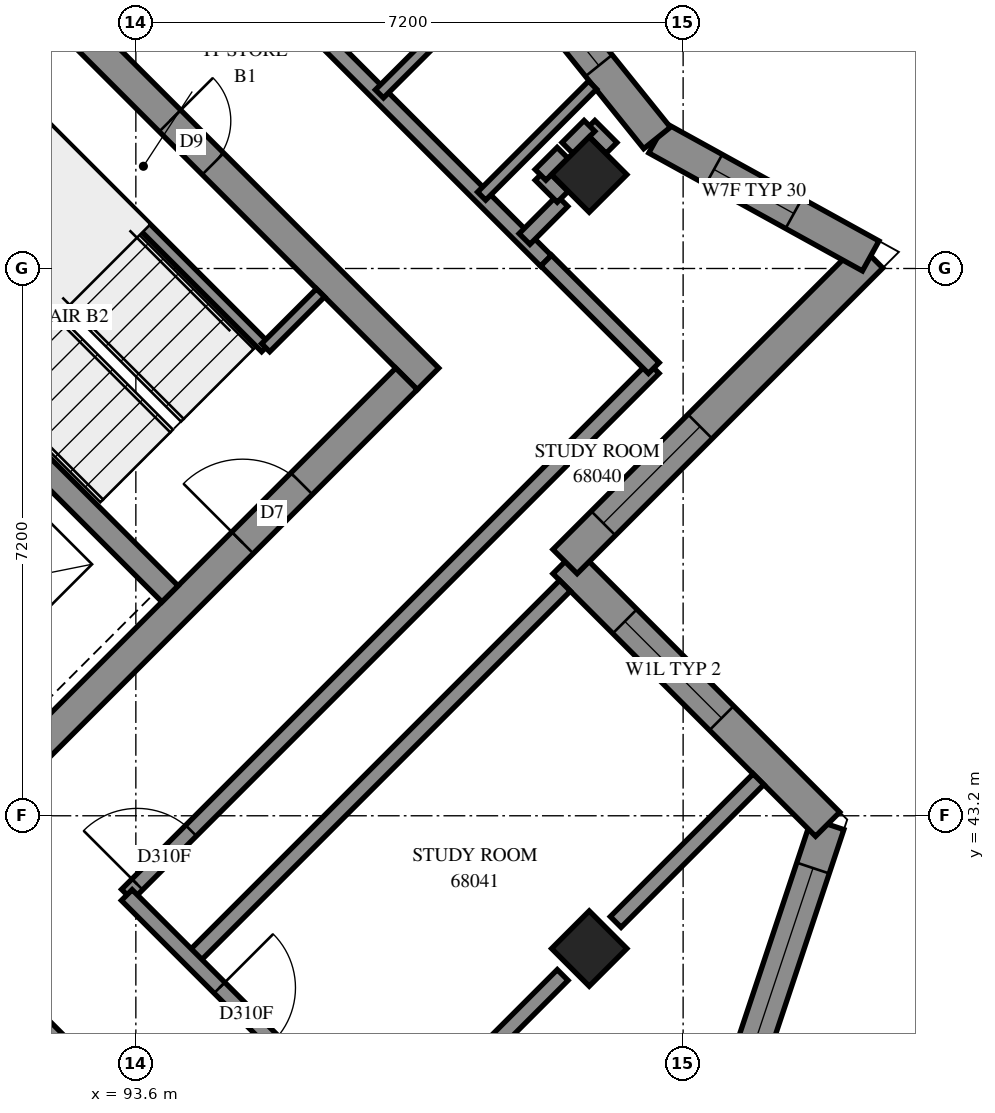
"""IFC4 building model, lengths in metres.
Left out: names, types, materials, properties, quantities, classifications, styles, units other than length and angle.
Written with IfcOpenShell. Run it as: python <this file> out.ifc"""

import sys

from ifc_helpers import new_model, si_unit, direction, frame, frame_2d, origin, origin_2d, place, context, subcontext, project, spatial, polyline, rectangle, outline, extrude, element, fill, save


model = new_model("IFC4")
c1 = context("Model", 3, precision=1e-05, world=origin(), true_north=direction((0.0, 1.0)))
c2 = subcontext(c1, "Body", "Model", "MODEL_VIEW")
j1 = project(units=[si_unit("LENGTHUNIT", "METRE"), si_unit("PLANEANGLEUNIT", "RADIAN")], contexts=[c1])
p1 = place(None, origin())
s1 = spatial("IfcSite", under=j1, at=p1, CompositionType="ELEMENT")
p2 = place(p1, origin())
s2 = spatial("IfcBuilding", under=s1, at=p2, CompositionType="ELEMENT")
p3 = place(p2, frame((0.0, 0.0, 250.6)))
s3 = spatial("IfcBuildingStorey", under=s2, at=p3, CompositionType="ELEMENT", Elevation=250.6)
for number, where, z_axis, x_axis in (
    (1, (99.565, 51.635, 0.0), (0.0, 0.0, 1.0), (0.707, -0.707, 0.0)),
    (2, (99.565, 41.453, 0.0), (0.0, 0.0, 1.0), (0.707, -0.707, 0.0)),
):
    element("IfcColumn", number, at=place(p3, frame(where, z_axis=z_axis, x_axis=x_axis)), inside=s3, PredefinedType="COLUMN", context=c2, shape_type="SweptSolid", body=[
        extrude(rectangle(XDim=0.7, YDim=0.7, at=origin_2d()), origin(), (0.0, 0.0, 1.0), 3.1),
    ])
p4 = place(p3, frame((86.695, 59.696, -0.3), z_axis=(0.0, 0.0, 1.0), x_axis=(0.7071100706, -0.7071034917, 0.0)))
e3 = element("IfcWall", 3, at=p4, inside=s3, PredefinedType="SHEAR", context=c2, shape_type="SweptSolid", body=[
    extrude(rectangle(XDim=15.2, YDim=0.4, at=frame_2d((7.6, 0.0))), origin(), (0.0, 0.0, 1.0), 2.7),
])
p5 = place(p4, frame((10.4, 0.0, 0.3)))
e4 = element("IfcOpeningElement", 4, at=p5, cuts=e3, PredefinedType="OPENING", context=c2, shape_type="SweptSolid", body=[
    extrude(rectangle(XDim=0.8, YDim=2.1, at=frame_2d((0.4, 1.05))), frame((0.0, 0.21, 0.0), z_axis=(0.0, -1.0, 0.0), x_axis=(1.0, 0.0, 0.0)), (0.0, 0.0, 1.0), 0.42),
])
p6 = place(p3, frame((86.978, 38.766, -0.3), z_axis=(0.0, 0.0, 1.0), x_axis=(0.7071067812, 0.7071067812, 0.0)))
e5 = element("IfcWall", 5, at=p6, inside=s3, PredefinedType="SHEAR", context=c2, shape_type="SweptSolid", body=[
    extrude(rectangle(XDim=14.4, YDim=0.4, at=frame_2d((7.2, 0.0))), origin(), (0.0, 0.0, 1.0), 2.7),
])
p7 = place(p6, frame((4.55, 0.0, 0.3)))
e6 = element("IfcOpeningElement", 6, at=p7, cuts=e5, PredefinedType="OPENING", context=c2, shape_type="SweptSolid", body=[
    extrude(rectangle(XDim=1.1, YDim=2.1, at=frame_2d((0.55, 1.05))), frame((0.0, 0.21, 0.0), z_axis=(0.0, -1.0, 0.0), x_axis=(1.0, 0.0, 0.0)), (0.0, 0.0, 1.0), 0.42),
])
p8 = place(p6, frame((11.35, 0.0, 0.3)))
e7 = element("IfcOpeningElement", 7, at=p8, cuts=e5, PredefinedType="OPENING", context=c2, shape_type="SweptSolid", body=[
    extrude(rectangle(XDim=1.1, YDim=2.1, at=frame_2d((0.55, 1.05))), frame((0.0, 0.21, 0.0), z_axis=(0.0, -1.0, 0.0), x_axis=(1.0, 0.0, 0.0)), (0.0, 0.0, 1.0), 0.42),
])
p9 = place(p3, frame((88.958, 51.211, 0.0), z_axis=(0.0, 0.0, 1.0), x_axis=(0.7070998367, -0.7071137256, 0.0)))
e8 = element("IfcWall", 8, at=p9, inside=s3, PredefinedType="SOLIDWALL", context=c2, shape_type="SweptSolid", body=[
    extrude(rectangle(XDim=7.2, YDim=0.3, at=frame_2d((3.6, 0.0))), origin(), (0.0, 0.0, 1.0), 3.1),
])
p10 = place(p3, frame((101.082, 38.232, 0.0), z_axis=(0.0, 0.0, 1.0), x_axis=(0.316227766, 0.9486832981, 0.0)))
e9 = element("IfcWall", 9, at=p10, inside=s3, PredefinedType="SOLIDWALL", context=c2, shape_type="SweptSolid", body=[
    extrude(outline(polyline([(-0.108, -0.225), (5.259, -0.225), (4.981, 0.225), (0.108, 0.225), (-0.108, -0.225)])), origin(), (0.0, 0.0, 1.0), 3.1),
])
p11 = place(p10, frame((1.711, 0.0, 0.45)))
e10 = element("IfcOpeningElement", 10, at=p11, cuts=e9, PredefinedType="OPENING", context=c2, shape_type="SweptSolid", body=[
    extrude(rectangle(XDim=2.8, YDim=2.55, at=frame_2d((1.4, 1.275))), frame((0.0, 0.235, 0.0), z_axis=(0.0, -1.0, 0.0), x_axis=(1.0, 0.0, 0.0)), (0.0, 0.0, 1.0), 0.47),
])
p12 = place(p3, frame((102.701, 43.089, 0.0), z_axis=(0.0, 0.0, 1.0), x_axis=(-0.7070965479, 0.7071170144, 0.0)))
e11 = element("IfcWall", 11, at=p12, inside=s3, PredefinedType="SOLIDWALL", context=c2, shape_type="SweptSolid", body=[
    extrude(outline(polyline([(-0.139, -0.225), (4.661, -0.225), (5.111, 0.225), (0.139, 0.225), (-0.139, -0.225)])), origin(), (0.0, 0.0, 1.0), 3.1),
])
p13 = place(p12, frame((1.974, 0.0, 0.6)))
e12 = element("IfcOpeningElement", 12, at=p13, cuts=e11, PredefinedType="OPENING", context=c2, shape_type="SweptSolid", body=[
    extrude(rectangle(XDim=1.8, YDim=1.9, at=frame_2d((0.9, 0.95))), frame((0.0, 0.235, 0.0), z_axis=(0.0, -1.0, 0.0), x_axis=(1.0, 0.0, 0.0)), (0.0, 0.0, 1.0), 0.47),
])
p14 = place(p3, frame((99.246, 46.544, 0.0), z_axis=(0.0, 0.0, 1.0), x_axis=(0.7071067812, 0.7071067812, 0.0)))
e13 = element("IfcWall", 13, at=p14, inside=s3, PredefinedType="SOLIDWALL", context=c2, shape_type="SweptSolid", body=[
    extrude(outline(polyline([(0.225, -0.225), (5.986, -0.225), (5.388, 0.225), (-0.225, 0.225), (0.225, -0.225)])), origin(), (0.0, 0.0, 1.0), 3.1),
])
p15 = place(p14, frame((0.713, 0.0, 0.6)))
e14 = element("IfcOpeningElement", 14, at=p15, cuts=e13, PredefinedType="OPENING", context=c2, shape_type="SweptSolid", body=[
    extrude(rectangle(XDim=1.8, YDim=1.9, at=frame_2d((0.9, 0.95))), frame((0.0, 0.235, 0.0), z_axis=(0.0, -1.0, 0.0), x_axis=(1.0, 0.0, 0.0)), (0.0, 0.0, 1.0), 0.47),
])
p16 = place(p3, frame((103.268, 50.565, 0.0), z_axis=(0.0, 0.0, 1.0), x_axis=(-0.8754572741, 0.4832955216, 0.0)))
e15 = element("IfcWall", 15, at=p16, inside=s3, PredefinedType="SOLIDWALL", context=c2, shape_type="SweptSolid", body=[
    extrude(outline(polyline([(-0.299, -0.225), (3.166, -0.225), (3.255, 0.225), (0.299, 0.225), (-0.299, -0.225)])), origin(), (0.0, 0.0, 1.0), 3.1),
])
p17 = place(p16, frame((1.155, 0.0, 0.45)))
e16 = element("IfcOpeningElement", 16, at=p17, cuts=e15, PredefinedType="OPENING", context=c2, shape_type="SweptSolid", body=[
    extrude(rectangle(XDim=1.2, YDim=2.55, at=frame_2d((0.6, 1.275))), frame((0.0, 0.235, 0.0), z_axis=(0.0, -1.0, 0.0), x_axis=(1.0, 0.0, 0.0)), (0.0, 0.0, 1.0), 0.47),
])
p18 = place(p3, frame((100.457, 52.117, 0.0), z_axis=(0.0, 0.0, 1.0), x_axis=(-0.6267598202, 0.7792125049, 0.0)))
e17 = element("IfcWall", 17, at=p18, inside=s3, PredefinedType="SOLIDWALL", context=c2, shape_type="SweptSolid", body=[
    extrude(outline(polyline([(0.044, -0.225), (3.393, -0.225), (3.345, 0.225), (-0.044, 0.225), (0.044, -0.225)])), origin(), (0.0, 0.0, 1.0), 3.1),
])
p19 = place(p18, frame((1.222, 0.0, 0.45)))
e18 = element("IfcOpeningElement", 18, at=p19, cuts=e17, PredefinedType="OPENING", context=c2, shape_type="SweptSolid", body=[
    extrude(rectangle(XDim=1.2, YDim=2.55, at=frame_2d((0.6, 1.275))), frame((0.0, 0.235, 0.0), z_axis=(0.0, -1.0, 0.0), x_axis=(1.0, 0.0, 0.0)), (0.0, 0.0, 1.0), 0.47),
])
p20 = place(p3, frame((91.313, 53.354, 0.0), z_axis=(0.0, 0.0, 1.0), x_axis=(0.7071067812, -0.7071067812, 0.0)))
e19 = element("IfcWall", 19, at=p20, inside=s3, PredefinedType="PARTITIONING", context=c2, shape_type="SweptSolid", body=[
    extrude(rectangle(XDim=5.65, YDim=0.15, at=frame_2d((2.825, 0.0))), origin(), (0.0, 0.0, 1.0), 3.1),
])
p21 = place(p3, frame((95.308, 49.358, 0.0), z_axis=(0.0, 0.0, 1.0), x_axis=(0.70705776, 0.707155799, 0.0)))
e20 = element("IfcWall", 20, at=p21, inside=s3, PredefinedType="PARTITIONING", context=c2, shape_type="SweptSolid", body=[
    extrude(rectangle(XDim=1.02, YDim=0.15, at=frame_2d((0.51, 0.0))), origin(), (0.0, 0.0, 1.0), 3.1),
])
p22 = place(p3, frame((93.483, 42.161, 0.0), z_axis=(0.0, 0.0, 1.0), x_axis=(0.7071067812, 0.7071067812, 0.0)))
e21 = element("IfcWall", 21, at=p22, inside=s3, PredefinedType="PARTITIONING", context=c2, shape_type="SweptSolid", body=[
    extrude(rectangle(XDim=9.8, YDim=0.2, at=frame_2d((4.9, 0.0))), origin(), (0.0, 0.0, 1.0), 3.1),
])
p23 = place(p22, frame((0.193, 0.0, 0.0)))
e22 = element("IfcOpeningElement", 22, at=p23, cuts=e21, PredefinedType="OPENING", context=c2, shape_type="SweptSolid", body=[
    extrude(rectangle(XDim=1.0, YDim=2.1, at=frame_2d((0.5, 1.05))), frame((0.0, 0.11, 0.0), z_axis=(0.0, -1.0, 0.0), x_axis=(1.0, 0.0, 0.0)), (0.0, 0.0, 1.0), 0.22),
])
p24 = place(p3, frame((94.331, 41.313, 0.0), z_axis=(0.0, 0.0, 1.0), x_axis=(0.7071139756, 0.7070995867, 0.0)))
e23 = element("IfcWall", 23, at=p24, inside=s3, PredefinedType="PARTITIONING", context=c2, shape_type="SweptSolid", body=[
    extrude(rectangle(XDim=6.95, YDim=0.2, at=frame_2d((3.475, 0.0))), origin(), (0.0, 0.0, 1.0), 3.1),
])
p25 = place(p3, frame((93.481, 42.157, 0.0), z_axis=(0.0, 0.0, 1.0), x_axis=(0.7071067812, -0.7071067812, 0.0)))
e24 = element("IfcWall", 24, at=p25, inside=s3, PredefinedType="PARTITIONING", context=c2, shape_type="SweptSolid", body=[
    extrude(rectangle(XDim=4.8, YDim=0.2, at=frame_2d((2.4, 0.0))), origin(), (0.0, 0.0, 1.0), 3.1),
])
p26 = place(p25, frame((1.725, 0.0, 0.0)))
e25 = element("IfcOpeningElement", 25, at=p26, cuts=e24, PredefinedType="OPENING", context=c2, shape_type="SweptSolid", body=[
    extrude(rectangle(XDim=1.0, YDim=2.1, at=frame_2d((0.5, 1.05))), frame((0.0, 0.11, 0.0), z_axis=(0.0, -1.0, 0.0), x_axis=(1.0, 0.0, 0.0)), (0.0, 0.0, 1.0), 0.22),
])
p27 = place(p3, frame((92.073, 40.749, 0.0), z_axis=(0.0, 0.0, 1.0), x_axis=(0.7071067812, -0.7071067812, 0.0)))
e26 = element("IfcWall", 26, at=p27, inside=s3, PredefinedType="PARTITIONING", context=c2, shape_type="SweptSolid", body=[
    extrude(rectangle(XDim=4.8, YDim=0.2, at=frame_2d((2.4, 0.0))), origin(), (0.0, 0.0, 1.0), 3.1),
])
p28 = place(p27, frame((1.725, 0.0, 0.0)))
e27 = element("IfcOpeningElement", 27, at=p28, cuts=e26, PredefinedType="OPENING", context=c2, shape_type="SweptSolid", body=[
    extrude(rectangle(XDim=1.0, YDim=2.1, at=frame_2d((0.5, 1.05))), frame((0.0, 0.11, 0.0), z_axis=(0.0, -1.0, 0.0), x_axis=(1.0, 0.0, 0.0)), (0.0, 0.0, 1.0), 0.22),
])
p29 = place(p3, frame((96.167, 53.329, 0.0), z_axis=(0.0, 0.0, 1.0), x_axis=(0.7071067812, -0.7071067812, 0.0)))
e28 = element("IfcWall", 28, at=p29, inside=s3, PredefinedType="PARTITIONING", context=c2, shape_type="SweptSolid", body=[
    extrude(rectangle(XDim=3.999, YDim=0.2, at=frame_2d((2.0, 0.0))), origin(), (0.0, 0.0, 1.0), 3.1),
])
p30 = place(p3, frame((96.877, 38.767, 0.0), z_axis=(0.0, 0.0, 1.0), x_axis=(0.7071067812, 0.7071067812, 0.0)))
e29 = element("IfcWall", 29, at=p30, inside=s3, PredefinedType="PARTITIONING", context=c2, shape_type="SweptSolid", body=[
    extrude(rectangle(XDim=3.306, YDim=0.2, at=frame_2d((1.653, 0.0))), origin(), (0.0, 0.0, 1.0), 2.6),
])
p31 = place(p3, frame((99.913, 41.803, 0.0), z_axis=(0.0, 0.0, 1.0), x_axis=(0.7071067812, 0.7071067812, 0.0)))
e30 = element("IfcWall", 30, at=p31, inside=s3, PredefinedType="PARTITIONING", context=c2, shape_type="SweptSolid", body=[
    extrude(rectangle(XDim=2.656, YDim=0.2, at=frame_2d((1.328, 0.0))), origin(), (0.0, 0.0, 1.0), 3.1),
])
p32 = place(p3, frame((96.804, 52.698, 0.0), z_axis=(0.0, 0.0, 1.0), x_axis=(0.7075691222, 0.7066441377, 0.0)))
e31 = element("IfcWall", 31, at=p32, inside=s3, PredefinedType="PARTITIONING", context=c2, shape_type="SweptSolid", body=[
    extrude(rectangle(XDim=2.27, YDim=0.15, at=frame_2d((1.135, 0.0))), origin(), (0.0, 0.0, 1.0), 3.1),
])
p33 = place(p32, frame((1.166, 0.0, 0.0)))
e32 = element("IfcOpeningElement", 32, at=p33, cuts=e31, PredefinedType="OPENING", context=c2, shape_type="SweptSolid", body=[
    extrude(rectangle(XDim=0.8, YDim=2.1, at=frame_2d((0.4, 1.05))), frame((0.0, 0.085, 0.0), z_axis=(0.0, -1.0, 0.0), x_axis=(1.0, 0.0, 0.0)), (0.0, 0.0, 1.0), 0.17),
])
p34 = place(p3, frame((98.149, 51.353, 0.0), z_axis=(0.0, 0.0, 1.0), x_axis=(0.707082559, 0.7071310026, 0.0)))
e33 = element("IfcWall", 33, at=p34, inside=s3, PredefinedType="PARTITIONING", context=c2, shape_type="SweptSolid", body=[
    extrude(rectangle(XDim=2.064, YDim=0.15, at=frame_2d((1.032, 0.0))), origin(), (0.0, 0.0, 1.0), 3.1),
])
p35 = place(p3, frame((98.998, 50.504, 0.0), z_axis=(0.0, 0.0, 1.0), x_axis=(0.7076063266, -0.7066068826, 0.0)))
e34 = element("IfcWall", 34, at=p35, inside=s3, PredefinedType="PARTITIONING", context=c2, shape_type="SweptSolid", body=[
    extrude(rectangle(XDim=2.001, YDim=0.2, at=frame_2d((1.001, 0.0))), origin(), (0.0, 0.0, 1.0), 3.1),
])
p36 = place(p3, frame((98.714, 50.788, 0.0), z_axis=(0.0, 0.0, 1.0), x_axis=(0.7056883165, 0.7085224061, 0.0)))
e35 = element("IfcWall", 35, at=p36, inside=s3, PredefinedType="PARTITIONING", context=c2, shape_type="SweptSolid", body=[
    extrude(rectangle(XDim=0.706, YDim=0.2, at=frame_2d((0.353, 0.0))), origin(), (0.0, 0.0, 1.0), 3.1),
])
for number, where, z_axis, x_axis in (
    (36, (99.568, 52.276, 0.0), (0.0, 0.0, 1.0), (0.707, -0.707, 0.0)),
    (37, (99.278, 51.986, 0.0), (0.0, 0.0, 1.0), (0.707, 0.707, 0.0)),
    (38, (98.925, 51.633, 0.0), (0.0, 0.0, 1.0), (0.707, -0.707, 0.0)),
    (39, (98.924, 51.632, 0.0), (0.0, 0.0, 1.0), (0.707, 0.707, 0.0)),
):
    element("IfcWall", number, at=place(p3, frame(where, z_axis=z_axis, x_axis=x_axis)), inside=s3, PredefinedType="PARTITIONING", context=c2, shape_type="SweptSolid", body=[
        extrude(rectangle(XDim=0.41, YDim=0.2, at=frame_2d((0.205, 0.0))), origin(), (0.0, 0.0, 1.0), 3.1),
    ])
p37 = place(p11, origin())
e40 = element("IfcWindow", 40, at=p37, inside=s3, PartitioningType="SINGLE_PANEL", PredefinedType="WINDOW", context=c2, shape_type="SweptSolid", body=[
    extrude(rectangle(XDim=2.8, YDim=2.55, at=frame_2d((1.4, 1.275))), frame((0.0, 0.205, 0.0), z_axis=(0.0, -1.0, 0.0), x_axis=(1.0, 0.0, 0.0)), (0.0, 0.0, 1.0), 0.06),
])
fill(e10, e40)
p38 = place(p13, origin())
e41 = element("IfcWindow", 41, at=p38, inside=s3, PartitioningType="SINGLE_PANEL", PredefinedType="WINDOW", context=c2, shape_type="SweptSolid", body=[
    extrude(rectangle(XDim=1.8, YDim=1.9, at=frame_2d((0.9, 0.95))), frame((0.0, 0.205, 0.0), z_axis=(0.0, -1.0, 0.0), x_axis=(1.0, 0.0, 0.0)), (0.0, 0.0, 1.0), 0.06),
])
fill(e12, e41)
p39 = place(p15, origin())
e42 = element("IfcWindow", 42, at=p39, inside=s3, PartitioningType="SINGLE_PANEL", PredefinedType="WINDOW", context=c2, shape_type="SweptSolid", body=[
    extrude(rectangle(XDim=1.8, YDim=1.9, at=frame_2d((0.9, 0.95))), frame((0.0, 0.205, 0.0), z_axis=(0.0, -1.0, 0.0), x_axis=(1.0, 0.0, 0.0)), (0.0, 0.0, 1.0), 0.06),
])
fill(e14, e42)
p40 = place(p17, origin())
e43 = element("IfcWindow", 43, at=p40, inside=s3, PartitioningType="SINGLE_PANEL", PredefinedType="WINDOW", context=c2, shape_type="SweptSolid", body=[
    extrude(rectangle(XDim=1.2, YDim=2.55, at=frame_2d((0.6, 1.275))), frame((0.0, 0.205, 0.0), z_axis=(0.0, -1.0, 0.0), x_axis=(1.0, 0.0, 0.0)), (0.0, 0.0, 1.0), 0.06),
])
fill(e16, e43)
p41 = place(p19, origin())
e44 = element("IfcWindow", 44, at=p41, inside=s3, PartitioningType="SINGLE_PANEL", PredefinedType="WINDOW", context=c2, shape_type="SweptSolid", body=[
    extrude(rectangle(XDim=1.2, YDim=2.55, at=frame_2d((0.6, 1.275))), frame((0.0, 0.205, 0.0), z_axis=(0.0, -1.0, 0.0), x_axis=(1.0, 0.0, 0.0)), (0.0, 0.0, 1.0), 0.06),
])
fill(e18, e44)
p42 = place(p5, origin())
e45 = element("IfcDoor", 45, at=p42, inside=s3, OperationType="SINGLE_SWING_RIGHT", PredefinedType="DOOR", context=c2, shape_type="SweptSolid", body=[
    extrude(rectangle(XDim=0.8, YDim=2.1, at=frame_2d((0.4, 1.05))), frame((0.0, 0.025, 0.0), z_axis=(0.0, -1.0, 0.0), x_axis=(1.0, 0.0, 0.0)), (0.0, 0.0, 1.0), 0.05),
])
fill(e4, e45)
p43 = place(p8, origin())
e46 = element("IfcDoor", 46, at=p43, inside=s3, OperationType="SINGLE_SWING_RIGHT", PredefinedType="DOOR", context=c2, shape_type="SweptSolid", body=[
    extrude(rectangle(XDim=1.1, YDim=2.1, at=frame_2d((0.55, 1.05))), frame((0.0, 0.025, 0.0), z_axis=(0.0, -1.0, 0.0), x_axis=(1.0, 0.0, 0.0)), (0.0, 0.0, 1.0), 0.05),
])
fill(e7, e46)
p44 = place(p23, origin())
e47 = element("IfcDoor", 47, at=p44, inside=s3, OperationType="SINGLE_SWING_LEFT", PredefinedType="DOOR", context=c2, shape_type="SweptSolid", body=[
    extrude(rectangle(XDim=1.0, YDim=2.1, at=frame_2d((0.5, 1.05))), frame((0.0, 0.025, 0.0), z_axis=(0.0, -1.0, 0.0), x_axis=(1.0, 0.0, 0.0)), (0.0, 0.0, 1.0), 0.05),
])
fill(e22, e47)
p45 = place(p26, origin())
e48 = element("IfcDoor", 48, at=p45, inside=s3, OperationType="SINGLE_SWING_RIGHT", PredefinedType="DOOR", context=c2, shape_type="SweptSolid", body=[
    extrude(rectangle(XDim=1.0, YDim=2.1, at=frame_2d((0.5, 1.05))), frame((0.0, 0.025, 0.0), z_axis=(0.0, -1.0, 0.0), x_axis=(1.0, 0.0, 0.0)), (0.0, 0.0, 1.0), 0.05),
])
fill(e25, e48)
save(model, sys.argv[1])
